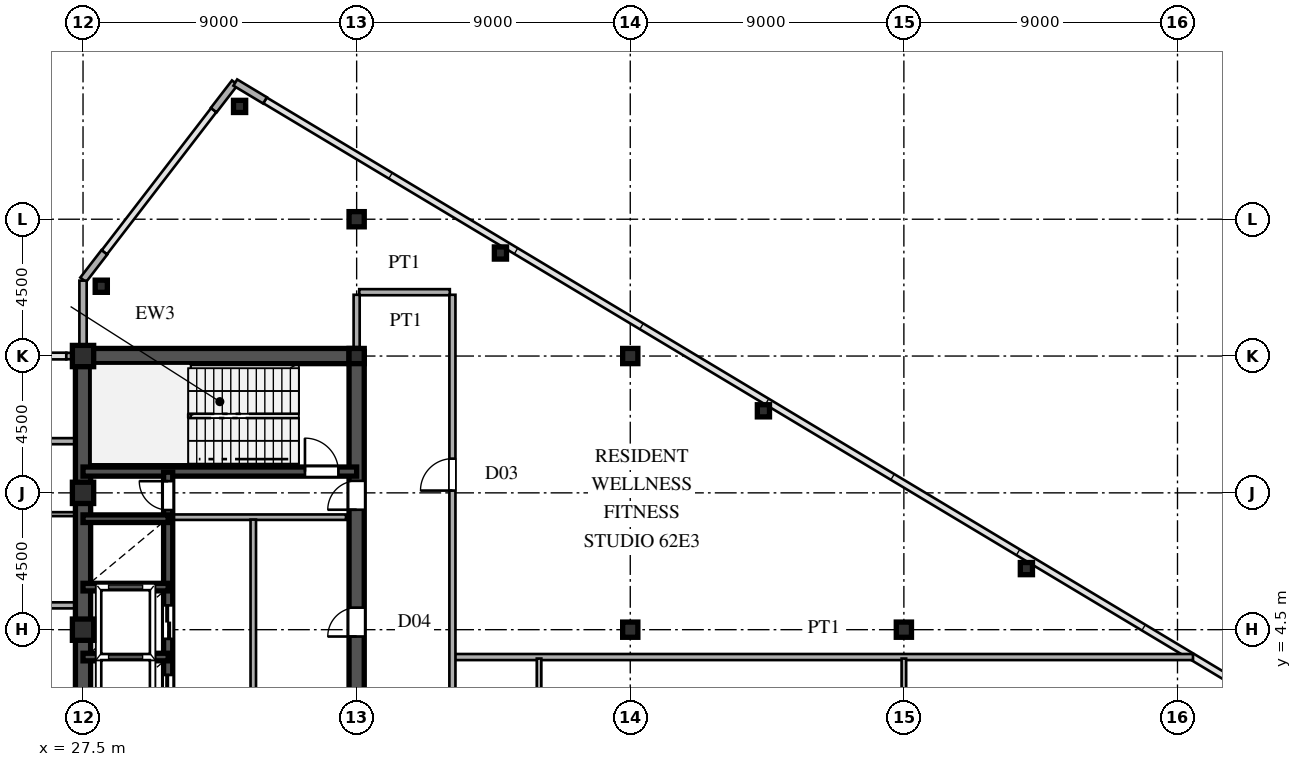
"""IFC4 building model, lengths in metres.
Left out: names, types, materials, properties, quantities, classifications, styles, units other than length and angle.
Written with IfcOpenShell. Run it as: python <this file> out.ifc"""

import sys

from ifc_helpers import new_model, si_unit, direction, frame, frame_2d, origin, origin_2d, place, context, subcontext, project, spatial, rectangle, hollow_rectangle, i_section, extrude, source, transform, mapped, element, fill, save


model = new_model("IFC4")
c1 = context("Model", 3, precision=1e-05, world=origin(), true_north=direction((0.0, 1.0)))
c2 = subcontext(c1, "Body", "Model", "MODEL_VIEW")
j1 = project(units=[si_unit("LENGTHUNIT", "METRE"), si_unit("PLANEANGLEUNIT", "RADIAN")], contexts=[c1])
p1 = place(None, origin())
s1 = spatial("IfcSite", under=j1, at=p1, CompositionType="ELEMENT")
p2 = place(p1, origin())
s2 = spatial("IfcBuilding", under=s1, at=p2, CompositionType="ELEMENT")
p3 = place(p2, frame((0.0, 0.0, 234.6)))
s3 = spatial("IfcBuildingStorey", under=s2, at=p3, CompositionType="ELEMENT", Elevation=234.6)
m1 = source(origin(), c2, "Body", "SweptSolid", [
    extrude(hollow_rectangle(XDim=0.7, YDim=0.7, WallThickness=0.03, at=origin_2d()), origin(), (0.0, 0.0, 1.0), 4.8),
])
for number, where, z_axis, x_axis in (
    (1, (27.5, 4.5, 0.0), (0.0, 0.0, 1.0), (1.0, 0.0, 0.0)),
    (2, (27.5, 9.0, 0.0), (0.0, 0.0, 1.0), (1.0, 0.0, 0.0)),
    (3, (27.5, 13.5, 0.0), (0.0, 0.0, 1.0), (1.0, 0.0, 0.0)),
):
    element("IfcColumn", number, at=place(p3, frame(where, z_axis=z_axis, x_axis=x_axis)), inside=s3, PredefinedType="COLUMN", context=c2, shape_type="MappedRepresentation", body=[
        mapped(m1, transform((0.0, 0.0, 0.0), scale=1.0)),
    ])
m2 = source(origin(), c2, "Body", "SweptSolid", [
    extrude(i_section(OverallWidth=0.5, OverallDepth=0.5, WebThickness=0.02, FlangeThickness=0.032, at=origin_2d()), origin(), (0.0, 0.0, 1.0), 4.8),
])
for number, where, z_axis, x_axis in (
    (4, (36.5, 13.5, 0.0), (0.0, 0.0, 1.0), (1.0, 0.0, 0.0)),
    (5, (36.5, 18.0, 0.0), (0.0, 0.0, 1.0), (1.0, 0.0, 0.0)),
    (6, (45.5, 4.5, 0.0), (0.0, 0.0, 1.0), (1.0, 0.0, 0.0)),
    (7, (45.5, 13.5, 0.0), (0.0, 0.0, 1.0), (1.0, 0.0, 0.0)),
    (8, (54.5, 4.5, 0.0), (0.0, 0.0, 1.0), (1.0, 0.0, 0.0)),
):
    element("IfcColumn", number, at=place(p3, frame(where, z_axis=z_axis, x_axis=x_axis)), inside=s3, PredefinedType="COLUMN", context=c2, shape_type="MappedRepresentation", body=[
        mapped(m2, transform((0.0, 0.0, 0.0), scale=1.0)),
    ])
m3 = source(origin(), c2, "Body", "SweptSolid", [
    extrude(hollow_rectangle(XDim=0.4, YDim=0.4, WallThickness=0.016, at=origin_2d()), origin(), (0.0, 0.0, 1.0), 4.8),
])
for number, where, z_axis, x_axis in (
    (9, (32.65, 21.71, 0.0), (0.0, 0.0, 1.0), (1.0, 0.0, 0.0)),
    (10, (28.1, 15.796, 0.0), (0.0, 0.0, 1.0), (1.0, 0.0, 0.0)),
    (11, (41.23, 16.889, 0.0), (0.0, 0.0, 1.0), (1.0, 0.0, 0.0)),
    (12, (49.88, 11.699, 0.0), (0.0, 0.0, 1.0), (1.0, 0.0, 0.0)),
    (13, (58.53, 6.509, 0.0), (0.0, 0.0, 1.0), (1.0, 0.0, 0.0)),
):
    element("IfcColumn", number, at=place(p3, frame(where, z_axis=z_axis, x_axis=x_axis)), inside=s3, PredefinedType="COLUMN", context=c2, shape_type="MappedRepresentation", body=[
        mapped(m3, transform((0.0, 0.0, 0.0), scale=1.0)),
    ])
for number, where, z_axis, x_axis in (
    (14, (33.486, 21.908, 0.0), (0.0, 0.0, 1.0), (-0.857, 0.515, 0.0)),
    (15, (32.494, 22.492, 0.0), (0.0, 0.0, 1.0), (-0.61, -0.793, 0.0)),
    (16, (28.201, 16.912, 0.0), (0.0, 0.0, 1.0), (-0.61, -0.793, 0.0)),
):
    element("IfcWall", number, at=place(p3, frame(where, z_axis=z_axis, x_axis=x_axis)), inside=s3, PredefinedType="SOLIDWALL", context=c2, shape_type="SweptSolid", body=[
        extrude(rectangle(XDim=1.14, YDim=0.24, at=frame_2d((0.57, 0.0))), origin(), (0.0, 0.0, 1.0), 4.58),
    ])
p4 = place(p3, frame((27.5, 13.755, 0.0), z_axis=(0.0, 0.0, 1.0), x_axis=(0.0, 1.0, 0.0)))
e17 = element("IfcWall", 17, at=p4, inside=s3, PredefinedType="SOLIDWALL", context=c2, shape_type="SweptSolid", body=[
    extrude(rectangle(XDim=0.62, YDim=0.24, at=frame_2d((0.31, 0.0))), origin(), (0.0, 0.0, 1.0), 4.08),
])
p5 = place(p3, frame((27.5, 14.375, 0.0), z_axis=(0.0, 0.0, 1.0), x_axis=(0.0, 1.0, 0.0)))
e18 = element("IfcWall", 18, at=p5, inside=s3, PredefinedType="SOLIDWALL", context=c2, shape_type="SweptSolid", body=[
    extrude(rectangle(XDim=1.605, YDim=0.24, at=frame_2d((0.803, 0.0))), origin(), (0.0, 0.0, 1.0), 4.58),
])
p6 = place(p3, frame((26.95, 13.5, 0.0), z_axis=(0.0, 0.0, 1.0), x_axis=(1.0, 0.0, 0.0)))
e19 = element("IfcWall", 19, at=p6, inside=s3, PredefinedType="SOLIDWALL", context=c2, shape_type="SweptSolid", body=[
    extrude(rectangle(XDim=0.54, YDim=0.21, at=frame_2d((0.27, 0.0))), origin(), (0.0, 0.0, 1.0), 2.78),
])
p7 = place(p3, frame((27.5, 1.3, 0.0), z_axis=(0.0, 0.0, 1.0), x_axis=(0.0, 1.0, 0.0)))
e20 = element("IfcWall", 20, at=p7, inside=s3, PredefinedType="SHEAR", context=c2, shape_type="SweptSolid", body=[
    extrude(rectangle(XDim=12.2, YDim=0.5, at=frame_2d((6.1, 0.0))), origin(), (0.0, 0.0, 1.0), 4.58),
])
p8 = place(p3, frame((27.5, 13.5, 0.0), z_axis=(0.0, 0.0, 1.0), x_axis=(1.0, 0.0, 0.0)))
e21 = element("IfcWall", 21, at=p8, inside=s3, PredefinedType="SHEAR", context=c2, shape_type="SweptSolid", body=[
    extrude(rectangle(XDim=9.0, YDim=0.5, at=frame_2d((4.5, 0.0))), origin(), (0.0, 0.0, 1.0), 4.58),
])
p9 = place(p3, frame((36.5, 8.2, 0.0), z_axis=(0.0, 0.0, 1.0), x_axis=(0.0, 1.0, 0.0)))
e22 = element("IfcWall", 22, at=p9, inside=s3, PredefinedType="SHEAR", context=c2, shape_type="SweptSolid", body=[
    extrude(rectangle(XDim=5.45, YDim=0.5, at=frame_2d((2.725, 0.0))), origin(), (0.0, 0.0, 1.0), 4.58),
])
p10 = place(p9, frame((0.245, 0.0, 0.0)))
e23 = element("IfcOpeningElement", 23, at=p10, cuts=e22, PredefinedType="OPENING", context=c2, shape_type="SweptSolid", body=[
    extrude(rectangle(XDim=0.95, YDim=2.15, at=frame_2d((0.475, 1.075))), frame((0.0, 0.26, 0.0), z_axis=(0.0, -1.0, 0.0), x_axis=(1.0, 0.0, 0.0)), (0.0, 0.0, 1.0), 0.52),
])
p11 = place(p3, frame((36.5, 1.3, 0.0), z_axis=(0.0, 0.0, 1.0), x_axis=(0.0, 1.0, 0.0)))
e24 = element("IfcWall", 24, at=p11, inside=s3, PredefinedType="SHEAR", context=c2, shape_type="SweptSolid", body=[
    extrude(rectangle(XDim=6.9, YDim=0.5, at=frame_2d((3.45, 0.0))), origin(), (0.0, 0.0, 1.0), 4.58),
])
p12 = place(p11, frame((2.975, 0.0, 0.0)))
e25 = element("IfcOpeningElement", 25, at=p12, cuts=e24, PredefinedType="OPENING", context=c2, shape_type="SweptSolid", body=[
    extrude(rectangle(XDim=0.95, YDim=2.15, at=frame_2d((0.475, 1.075))), frame((0.0, 0.26, 0.0), z_axis=(0.0, -1.0, 0.0), x_axis=(1.0, 0.0, 0.0)), (0.0, 0.0, 1.0), 0.52),
])
p13 = place(p3, frame((27.5, 9.7, 0.0), z_axis=(0.0, 0.0, 1.0), x_axis=(1.0, 0.0, 0.0)))
e26 = element("IfcWall", 26, at=p13, inside=s3, PredefinedType="SHEAR", context=c2, shape_type="SweptSolid", body=[
    extrude(rectangle(XDim=9.0, YDim=0.3, at=frame_2d((4.5, 0.0))), origin(), (0.0, 0.0, 1.0), 4.58),
])
p14 = place(p13, frame((7.3, 0.0, 0.0)))
e27 = element("IfcOpeningElement", 27, at=p14, cuts=e26, PredefinedType="OPENING", context=c2, shape_type="SweptSolid", body=[
    extrude(rectangle(XDim=1.1, YDim=2.2, at=frame_2d((0.55, 1.1))), frame((0.0, 0.16, 0.0), z_axis=(0.0, -1.0, 0.0), x_axis=(1.0, 0.0, 0.0)), (0.0, 0.0, 1.0), 0.32),
])
for number, where, z_axis, x_axis in (
    (28, (27.5, 3.6, 0.0), (0.0, 0.0, 1.0), (1.0, 0.0, 0.0)),
    (29, (27.5, 5.9, 0.0), (0.0, 0.0, 1.0), (1.0, 0.0, 0.0)),
    (30, (27.5, 8.15, 0.0), (0.0, 0.0, 1.0), (1.0, 0.0, 0.0)),
):
    element("IfcWall", number, at=place(p3, frame(where, z_axis=z_axis, x_axis=x_axis)), inside=s3, PredefinedType="SHEAR", context=c2, shape_type="SweptSolid", body=[
        extrude(rectangle(XDim=2.8, YDim=0.25, at=frame_2d((1.4, 0.0))), origin(), (0.0, 0.0, 1.0), 4.58),
    ])
p15 = place(p3, frame((30.3, 1.32, 0.0), z_axis=(0.0, 0.0, 1.0), x_axis=(0.0, 1.0, 0.0)))
e31 = element("IfcWall", 31, at=p15, inside=s3, PredefinedType="SHEAR", context=c2, shape_type="SweptSolid", body=[
    extrude(rectangle(XDim=2.28, YDim=0.3, at=frame_2d((1.14, 0.0))), origin(), (0.0, 0.0, 1.0), 4.58),
])
p16 = place(p15, frame((0.59, 0.0, 0.0)))
e32 = element("IfcOpeningElement", 32, at=p16, cuts=e31, PredefinedType="OPENING", context=c2, shape_type="SweptSolid", body=[
    extrude(rectangle(XDim=1.1, YDim=2.2, at=frame_2d((0.55, 1.1))), frame((0.0, 0.16, 0.0), z_axis=(0.0, -1.0, 0.0), x_axis=(1.0, 0.0, 0.0)), (0.0, 0.0, 1.0), 0.32),
])
p17 = place(p3, frame((30.3, 3.6, 0.0), z_axis=(0.0, 0.0, 1.0), x_axis=(0.0, 1.0, 0.0)))
e33 = element("IfcWall", 33, at=p17, inside=s3, PredefinedType="SHEAR", context=c2, shape_type="SweptSolid", body=[
    extrude(rectangle(XDim=2.3, YDim=0.3, at=frame_2d((1.15, 0.0))), origin(), (0.0, 0.0, 1.0), 4.58),
])
p18 = place(p17, frame((0.6, 0.0, 0.0)))
e34 = element("IfcOpeningElement", 34, at=p18, cuts=e33, PredefinedType="OPENING", context=c2, shape_type="SweptSolid", body=[
    extrude(rectangle(XDim=1.1, YDim=2.2, at=frame_2d((0.55, 1.1))), frame((0.0, 0.16, 0.0), z_axis=(0.0, -1.0, 0.0), x_axis=(1.0, 0.0, 0.0)), (0.0, 0.0, 1.0), 0.32),
])
p19 = place(p3, frame((30.3, 5.9, 0.0), z_axis=(0.0, 0.0, 1.0), x_axis=(0.0, 1.0, 0.0)))
e35 = element("IfcWall", 35, at=p19, inside=s3, PredefinedType="SHEAR", context=c2, shape_type="SweptSolid", body=[
    extrude(rectangle(XDim=2.25, YDim=0.3, at=frame_2d((1.125, 0.0))), origin(), (0.0, 0.0, 1.0), 4.58),
])
p20 = place(p3, frame((30.3, 8.15, 0.0), z_axis=(0.0, 0.0, 1.0), x_axis=(0.0, 1.0, 0.0)))
e36 = element("IfcWall", 36, at=p20, inside=s3, PredefinedType="SHEAR", context=c2, shape_type="SweptSolid", body=[
    extrude(rectangle(XDim=1.53, YDim=0.3, at=frame_2d((0.765, 0.0))), origin(), (0.0, 0.0, 1.0), 4.58),
])
p21 = place(p20, frame((0.285, 0.0, 0.0)))
e37 = element("IfcOpeningElement", 37, at=p21, cuts=e36, PredefinedType="OPENING", context=c2, shape_type="SweptSolid", body=[
    extrude(rectangle(XDim=0.95, YDim=2.15, at=frame_2d((0.475, 1.075))), frame((0.0, 0.16, 0.0), z_axis=(0.0, -1.0, 0.0), x_axis=(1.0, 0.0, 0.0)), (0.0, 0.0, 1.0), 0.32),
])
p22 = place(p3, frame((30.45, 8.2, 0.0), z_axis=(0.0, 0.0, 1.0), x_axis=(1.0, 0.0, 0.0)))
e38 = element("IfcWall", 38, at=p22, inside=s3, PredefinedType="PARTITIONING", context=c2, shape_type="SweptSolid", body=[
    extrude(rectangle(XDim=5.7, YDim=0.18, at=frame_2d((2.85, 0.0))), origin(), (0.0, 0.0, 1.0), 4.58),
])
p23 = place(p3, frame((33.1, 1.38, 0.0), z_axis=(0.0, 0.0, 1.0), x_axis=(0.0, 1.0, 0.0)))
e39 = element("IfcWall", 39, at=p23, inside=s3, PredefinedType="PARTITIONING", context=c2, shape_type="SweptSolid", body=[
    extrude(rectangle(XDim=6.74, YDim=0.18, at=frame_2d((3.37, 0.0))), origin(), (0.0, 0.0, 1.0), 4.58),
])
p24 = place(p3, frame((39.73, 3.6, 0.0), z_axis=(0.0, 0.0, 1.0), x_axis=(1.0, 0.0, 0.0)))
e40 = element("IfcWall", 40, at=p24, inside=s3, PredefinedType="PARTITIONING", context=c2, shape_type="SweptSolid", body=[
    extrude(rectangle(XDim=24.28, YDim=0.2, at=frame_2d((12.14, 0.0))), origin(), (0.0, 0.0, 1.0), 4.58),
])
p25 = place(p3, frame((-27.245, 5.3, 0.0), z_axis=(0.0, 0.0, 1.0), x_axis=(1.0, 0.0, 0.0)))
e41 = element("IfcWall", 41, at=p25, inside=s3, PredefinedType="PARTITIONING", context=c2, shape_type="SweptSolid", body=[
    extrude(rectangle(XDim=54.49, YDim=0.2, at=frame_2d((27.245, 0.0))), origin(), (0.0, 0.0, 1.0), 4.58),
])
p26 = place(p25, frame((25.77, 0.0, 0.0)))
e42 = element("IfcOpeningElement", 42, at=p26, cuts=e41, PredefinedType="OPENING", context=c2, shape_type="SweptSolid", body=[
    extrude(rectangle(XDim=1.15, YDim=2.2, at=frame_2d((0.575, 1.1))), frame((0.0, 0.11, 0.0), z_axis=(0.0, -1.0, 0.0), x_axis=(1.0, 0.0, 0.0)), (0.0, 0.0, 1.0), 0.22),
])
p27 = place(p25, frame((35.17, 0.0, 0.0)))
e43 = element("IfcOpeningElement", 43, at=p27, cuts=e41, PredefinedType="OPENING", context=c2, shape_type="SweptSolid", body=[
    extrude(rectangle(XDim=1.15, YDim=2.2, at=frame_2d((0.575, 1.1))), frame((0.0, 0.11, 0.0), z_axis=(0.0, -1.0, 0.0), x_axis=(1.0, 0.0, 0.0)), (0.0, 0.0, 1.0), 0.22),
])
p28 = place(p25, frame((17.67, 0.0, 0.0)))
e44 = element("IfcOpeningElement", 44, at=p28, cuts=e41, PredefinedType="OPENING", context=c2, shape_type="SweptSolid", body=[
    extrude(rectangle(XDim=1.15, YDim=2.2, at=frame_2d((0.575, 1.1))), frame((0.0, 0.11, 0.0), z_axis=(0.0, -1.0, 0.0), x_axis=(1.0, 0.0, 0.0)), (0.0, 0.0, 1.0), 0.22),
])
p29 = place(p25, frame((46.055, 0.0, 0.0)))
e45 = element("IfcOpeningElement", 45, at=p29, cuts=e41, PredefinedType="OPENING", context=c2, shape_type="SweptSolid", body=[
    extrude(rectangle(XDim=0.88, YDim=2.1, at=frame_2d((0.44, 1.05))), frame((0.0, 0.11, 0.0), z_axis=(0.0, -1.0, 0.0), x_axis=(1.0, 0.0, 0.0)), (0.0, 0.0, 1.0), 0.22),
])
p30 = place(p25, frame((51.405, 0.0, 0.0)))
e46 = element("IfcOpeningElement", 46, at=p30, cuts=e41, PredefinedType="OPENING", context=c2, shape_type="SweptSolid", body=[
    extrude(rectangle(XDim=0.88, YDim=2.1, at=frame_2d((0.44, 1.05))), frame((0.0, 0.11, 0.0), z_axis=(0.0, -1.0, 0.0), x_axis=(1.0, 0.0, 0.0)), (0.0, 0.0, 1.0), 0.22),
])
p31 = place(p3, frame((16.585, 8.3, 0.0), z_axis=(0.0, 0.0, 1.0), x_axis=(1.0, 0.0, 0.0)))
e47 = element("IfcWall", 47, at=p31, inside=s3, PredefinedType="PARTITIONING", context=c2, shape_type="SweptSolid", body=[
    extrude(rectangle(XDim=10.66, YDim=0.13, at=frame_2d((5.33, 0.0))), origin(), (0.0, 0.0, 1.0), 4.58),
])
p32 = place(p3, frame((-27.245, 10.7, 0.0), z_axis=(0.0, 0.0, 1.0), x_axis=(1.0, 0.0, 0.0)))
e48 = element("IfcWall", 48, at=p32, inside=s3, PredefinedType="PARTITIONING", context=c2, shape_type="SweptSolid", body=[
    extrude(rectangle(XDim=54.49, YDim=0.2, at=frame_2d((27.245, 0.0))), origin(), (0.0, 0.0, 1.0), 4.58),
])
p33 = place(p32, frame((25.77, 0.0, 0.0)))
e49 = element("IfcOpeningElement", 49, at=p33, cuts=e48, PredefinedType="OPENING", context=c2, shape_type="SweptSolid", body=[
    extrude(rectangle(XDim=1.15, YDim=2.2, at=frame_2d((0.575, 1.1))), frame((0.0, 0.11, 0.0), z_axis=(0.0, -1.0, 0.0), x_axis=(1.0, 0.0, 0.0)), (0.0, 0.0, 1.0), 0.22),
])
p34 = place(p3, frame((36.585, 15.6, 0.0), z_axis=(0.0, 0.0, 1.0), x_axis=(1.0, 0.0, 0.0)))
e50 = element("IfcWall", 50, at=p34, inside=s3, PredefinedType="PARTITIONING", context=c2, shape_type="SweptSolid", body=[
    extrude(rectangle(XDim=2.98, YDim=0.2, at=frame_2d((1.49, 0.0))), origin(), (0.0, 0.0, 1.0), 4.58),
])
p35 = place(p3, frame((36.5, 13.755, 0.0), z_axis=(0.0, 0.0, 1.0), x_axis=(0.0, 1.0, 0.0)))
e51 = element("IfcWall", 51, at=p35, inside=s3, PredefinedType="PARTITIONING", context=c2, shape_type="SweptSolid", body=[
    extrude(rectangle(XDim=1.76, YDim=0.2, at=frame_2d((0.88, 0.0))), origin(), (0.0, 0.0, 1.0), 3.98),
])
p36 = place(p3, frame((39.65, -15.515, 0.0), z_axis=(0.0, 0.0, 1.0), x_axis=(0.0, 1.0, 0.0)))
e52 = element("IfcWall", 52, at=p36, inside=s3, PredefinedType="PARTITIONING", context=c2, shape_type="SweptSolid", body=[
    extrude(rectangle(XDim=31.03, YDim=0.2, at=frame_2d((15.515, 0.0))), origin(), (0.0, 0.0, 1.0), 4.58),
])
p37 = place(p36, frame((2.49, 0.0, 0.0)))
e53 = element("IfcOpeningElement", 53, at=p37, cuts=e52, PredefinedType="OPENING", context=c2, shape_type="SweptSolid", body=[
    extrude(rectangle(XDim=1.05, YDim=2.25, at=frame_2d((0.525, 1.125))), frame((0.0, 0.11, 0.0), z_axis=(0.0, -1.0, 0.0), x_axis=(1.0, 0.0, 0.0)), (0.0, 0.0, 1.0), 0.22),
])
p38 = place(p36, frame((11.895, 0.0, 0.0)))
e54 = element("IfcOpeningElement", 54, at=p38, cuts=e52, PredefinedType="OPENING", context=c2, shape_type="SweptSolid", body=[
    extrude(rectangle(XDim=1.05, YDim=2.25, at=frame_2d((0.525, 1.125))), frame((0.0, 0.11, 0.0), z_axis=(0.0, -1.0, 0.0), x_axis=(1.0, 0.0, 0.0)), (0.0, 0.0, 1.0), 0.22),
])
p39 = place(p36, frame((24.59, 0.0, 0.0)))
e55 = element("IfcOpeningElement", 55, at=p39, cuts=e52, PredefinedType="OPENING", context=c2, shape_type="SweptSolid", body=[
    extrude(rectangle(XDim=1.05, YDim=2.25, at=frame_2d((0.525, 1.125))), frame((0.0, 0.11, 0.0), z_axis=(0.0, -1.0, 0.0), x_axis=(1.0, 0.0, 0.0)), (0.0, 0.0, 1.0), 0.22),
])
p40 = place(p3, frame((42.5, -0.248, 0.0), z_axis=(0.0, 0.0, 1.0), x_axis=(0.0, 1.0, 0.0)))
e56 = element("IfcWall", 56, at=p40, inside=s3, PredefinedType="PARTITIONING", context=c2, shape_type="SweptSolid", body=[
    extrude(rectangle(XDim=3.798, YDim=0.15, at=frame_2d((1.899, 0.0))), origin(), (0.0, 0.0, 1.0), 4.58),
])
p41 = place(p3, frame((54.5, -9.335, 0.0), z_axis=(0.0, 0.0, 1.0), x_axis=(0.0, 1.0, 0.0)))
e57 = element("IfcWall", 57, at=p41, inside=s3, PredefinedType="PARTITIONING", context=c2, shape_type="SweptSolid", body=[
    extrude(rectangle(XDim=12.885, YDim=0.15, at=frame_2d((6.442, 0.0))), origin(), (0.0, 0.0, 1.0), 3.98),
])
p42 = place(p41, frame((5.96, 0.0, 0.0)))
e58 = element("IfcOpeningElement", 58, at=p42, cuts=e57, PredefinedType="OPENING", context=c2, shape_type="SweptSolid", body=[
    extrude(rectangle(XDim=0.95, YDim=2.15, at=frame_2d((0.475, 1.075))), frame((0.0, 0.085, 0.0), z_axis=(0.0, -1.0, 0.0), x_axis=(1.0, 0.0, 0.0)), (0.0, 0.0, 1.0), 0.17),
])
p43 = place(p41, frame((1.677, 0.0, 0.0)))
e59 = element("IfcOpeningElement", 59, at=p43, cuts=e57, PredefinedType="OPENING", context=c2, shape_type="SweptSolid", body=[
    extrude(rectangle(XDim=0.95, YDim=2.15, at=frame_2d((0.475, 1.075))), frame((0.0, 0.085, 0.0), z_axis=(0.0, -1.0, 0.0), x_axis=(1.0, 0.0, 0.0)), (0.0, 0.0, 1.0), 0.17),
])
p44 = place(p41, frame((10.293, 0.0, 0.0)))
e60 = element("IfcOpeningElement", 60, at=p44, cuts=e57, PredefinedType="OPENING", context=c2, shape_type="SweptSolid", body=[
    extrude(rectangle(XDim=0.95, YDim=2.15, at=frame_2d((0.475, 1.075))), frame((0.0, 0.085, 0.0), z_axis=(0.0, -1.0, 0.0), x_axis=(1.0, 0.0, 0.0)), (0.0, 0.0, 1.0), 0.17),
])
m4 = source(origin(), c2, "Body", "SweptSolid", [
    extrude(rectangle(XDim=0.95, YDim=2.15, at=frame_2d((0.475, 1.075))), frame((0.0, 0.025, 0.0), z_axis=(0.0, -1.0, 0.0), x_axis=(1.0, 0.0, 0.0)), (0.0, 0.0, 1.0), 0.05),
])
p45 = place(p10, origin())
e61 = element("IfcDoor", 61, at=p45, inside=s3, OperationType="SINGLE_SWING_LEFT", PredefinedType="DOOR", context=c2, shape_type="MappedRepresentation", body=[
    mapped(m4, transform((0.0, 0.0, 0.0), scale=1.0)),
])
fill(e23, e61)
p46 = place(p12, origin())
e62 = element("IfcDoor", 62, at=p46, inside=s3, OperationType="SINGLE_SWING_LEFT", PredefinedType="DOOR", context=c2, shape_type="MappedRepresentation", body=[
    mapped(m4, transform((0.0, 0.0, 0.0), scale=1.0)),
])
fill(e25, e62)
m5 = source(origin(), c2, "Body", "SweptSolid", [
    extrude(rectangle(XDim=1.1, YDim=2.2, at=frame_2d((0.55, 1.1))), frame((0.0, 0.025, 0.0), z_axis=(0.0, -1.0, 0.0), x_axis=(1.0, 0.0, 0.0)), (0.0, 0.0, 1.0), 0.05),
])
p47 = place(p14, origin())
e63 = element("IfcDoor", 63, at=p47, inside=s3, OperationType="SINGLE_SWING_LEFT", PredefinedType="DOOR", context=c2, shape_type="MappedRepresentation", body=[
    mapped(m5, transform((0.0, 0.0, 0.0), scale=1.0)),
])
fill(e27, e63)
m6 = source(origin(), c2, "Body", "SweptSolid", [
    extrude(rectangle(XDim=1.1, YDim=2.2, at=frame_2d((0.55, 1.1))), frame((0.0, 0.025, 0.0), z_axis=(0.0, -1.0, 0.0), x_axis=(1.0, 0.0, 0.0)), (0.0, 0.0, 1.0), 0.05),
])
p48 = place(p16, origin())
e64 = element("IfcDoor", 64, at=p48, inside=s3, OperationType="DOUBLE_DOOR_SLIDING", PredefinedType="DOOR", context=c2, shape_type="MappedRepresentation", body=[
    mapped(m6, transform((0.0, 0.0, 0.0), scale=1.0)),
])
fill(e32, e64)
p49 = place(p18, origin())
e65 = element("IfcDoor", 65, at=p49, inside=s3, OperationType="DOUBLE_DOOR_SLIDING", PredefinedType="DOOR", context=c2, shape_type="MappedRepresentation", body=[
    mapped(m6, transform((0.0, 0.0, 0.0), scale=1.0)),
])
fill(e34, e65)
p50 = place(p21, origin())
e66 = element("IfcDoor", 66, at=p50, inside=s3, OperationType="SINGLE_SWING_RIGHT", PredefinedType="DOOR", context=c2, shape_type="MappedRepresentation", body=[
    mapped(m4, transform((0.0, 0.0, 0.0), scale=1.0)),
])
fill(e37, e66)
m7 = source(origin(), c2, "Body", "SweptSolid", [
    extrude(rectangle(XDim=1.05, YDim=2.25, at=frame_2d((0.525, 1.125))), frame((0.0, 0.025, 0.0), z_axis=(0.0, -1.0, 0.0), x_axis=(1.0, 0.0, 0.0)), (0.0, 0.0, 1.0), 0.05),
])
p51 = place(p39, origin())
e67 = element("IfcDoor", 67, at=p51, inside=s3, OperationType="SINGLE_SWING_LEFT", PredefinedType="DOOR", context=c2, shape_type="MappedRepresentation", body=[
    mapped(m7, transform((0.0, 0.0, 0.0), scale=1.0)),
])
fill(e55, e67)
save(model, sys.argv[1])
